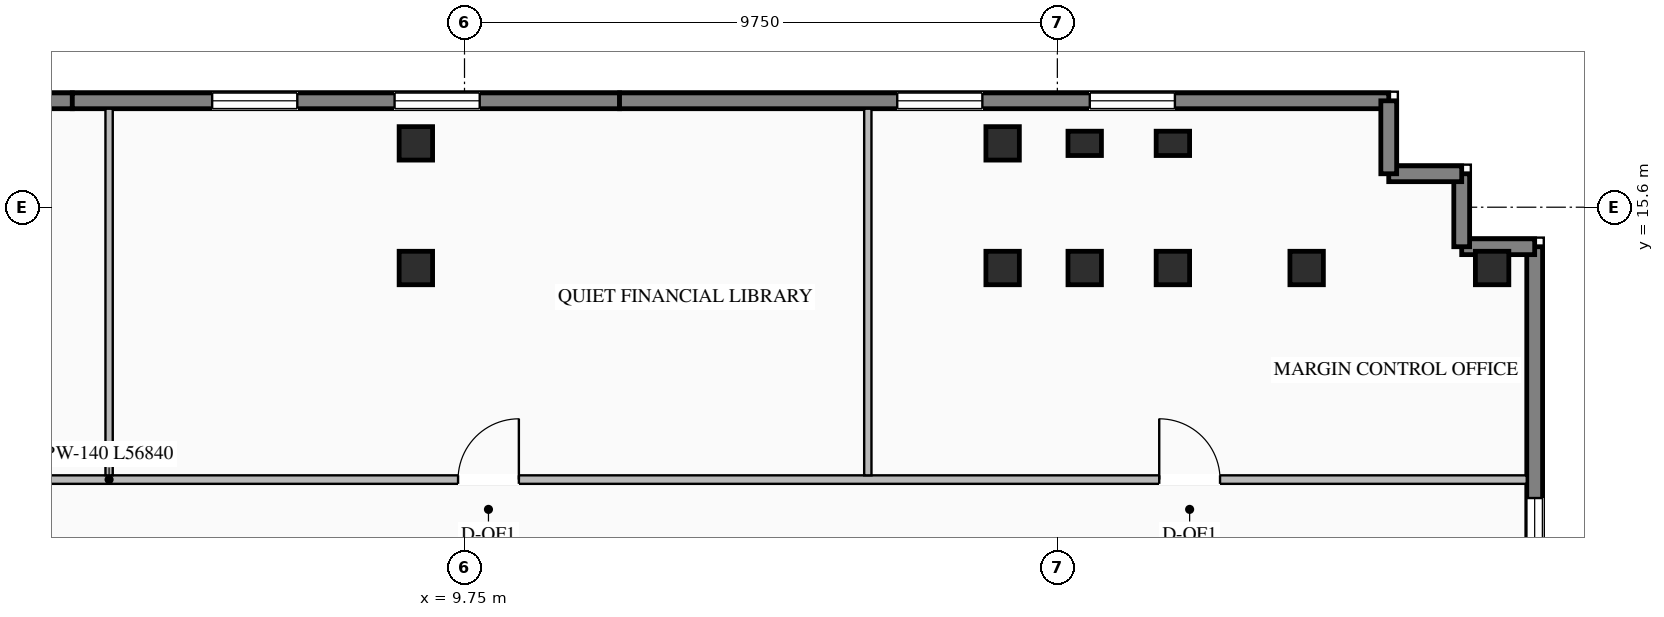
"""IFC4 building model, lengths in metres.
Left out: names, types, materials, properties, quantities, classifications, styles, units other than length and angle.
Written with IfcOpenShell. Run it as: python <this file> out.ifc"""

import sys

from ifc_helpers import new_model, si_unit, direction, frame, frame_2d, origin, origin_2d, place, context, subcontext, project, spatial, rectangle, i_section, extrude, element, fill, save


model = new_model("IFC4")
c1 = context("Model", 3, precision=1e-05, world=origin(), true_north=direction((0.0, 1.0)))
c2 = subcontext(c1, "Body", "Model", "MODEL_VIEW")
j1 = project(units=[si_unit("LENGTHUNIT", "METRE"), si_unit("PLANEANGLEUNIT", "RADIAN")], contexts=[c1])
p1 = place(None, origin())
s1 = spatial("IfcSite", under=j1, at=p1, CompositionType="ELEMENT")
p2 = place(p1, origin())
s2 = spatial("IfcBuilding", under=s1, at=p2, CompositionType="ELEMENT")
p3 = place(p2, frame((0.0, 0.0, 218.85)))
s3 = spatial("IfcBuildingStorey", under=s2, at=p3, CompositionType="ELEMENT", Elevation=218.85)
for number, where, z_axis, x_axis in (
    (1, (8.95, 14.6, 0.0), (0.0, 0.0, 1.0), (1.0, 0.0, 0.0)),
    (2, (18.6, 14.6, 0.0), (0.0, 0.0, 1.0), (1.0, 0.0, 0.0)),
    (3, (19.95, 14.6, 0.0), (0.0, 0.0, 1.0), (1.0, 0.0, 0.0)),
    (4, (21.4, 14.6, 0.0), (0.0, 0.0, 1.0), (1.0, 0.0, 0.0)),
    (5, (23.6, 14.6, 0.0), (0.0, 0.0, 1.0), (1.0, 0.0, 0.0)),
    (6, (8.95, 16.65, 0.0), (0.0, 0.0, 1.0), (1.0, 0.0, 0.0)),
    (7, (18.6, 16.65, 0.0), (0.0, 0.0, 1.0), (1.0, 0.0, 0.0)),
    (8, (26.65, 14.6, 0.0), (0.0, 0.0, 1.0), (1.0, 0.0, 0.0)),
):
    element("IfcColumn", number, at=place(p3, frame(where, z_axis=z_axis, x_axis=x_axis)), inside=s3, PredefinedType="COLUMN", context=c2, shape_type="SweptSolid", body=[
        extrude(i_section(OverallWidth=0.55, OverallDepth=0.55, WebThickness=0.024, FlangeThickness=0.036, at=origin_2d()), origin(), (0.0, 0.0, 1.0), 3.45),
    ])
for number, where, z_axis, x_axis in (
    (9, (19.95, 16.65, 0.0), (0.0, 0.0, 1.0), (1.0, 0.0, 0.0)),
    (10, (21.4, 16.65, 0.0), (0.0, 0.0, 1.0), (1.0, 0.0, 0.0)),
):
    element("IfcColumn", number, at=place(p3, frame(where, z_axis=z_axis, x_axis=x_axis)), inside=s3, PredefinedType="PILASTER", context=c2, shape_type="SweptSolid", body=[
        extrude(rectangle(XDim=0.55, YDim=0.4, at=origin_2d()), origin(), (0.0, 0.0, 1.0), 3.45),
    ])
p4 = place(p3, frame((-5.7, 17.35, 0.0), z_axis=(0.0, 0.0, 1.0), x_axis=(1.0, 0.0, 0.0)))
e11 = element("IfcWall", 11, at=p4, inside=s3, PredefinedType="STANDARD", context=c2, shape_type="SweptSolid", body=[
    extrude(rectangle(XDim=9.0, YDim=0.26, at=frame_2d((4.5, 0.0))), origin(), (0.0, 0.0, 1.0), 3.25),
])
p5 = place(p4, frame((2.3, 0.0, 0.76)))
e12 = element("IfcOpeningElement", 12, at=p5, cuts=e11, PredefinedType="OPENING", context=c2, shape_type="SweptSolid", body=[
    extrude(rectangle(XDim=1.4, YDim=1.95, at=frame_2d((0.7, 0.975))), frame((0.0, 0.14, 0.0), z_axis=(0.0, -1.0, 0.0), x_axis=(1.0, 0.0, 0.0)), (0.0, 0.0, 1.0), 0.28),
])
p6 = place(p4, frame((5.3, 0.0, 0.76)))
e13 = element("IfcOpeningElement", 13, at=p6, cuts=e11, PredefinedType="OPENING", context=c2, shape_type="SweptSolid", body=[
    extrude(rectangle(XDim=1.4, YDim=1.95, at=frame_2d((0.7, 0.975))), frame((0.0, 0.14, 0.0), z_axis=(0.0, -1.0, 0.0), x_axis=(1.0, 0.0, 0.0)), (0.0, 0.0, 1.0), 0.28),
])
p7 = place(p3, frame((3.3, 17.35, 0.0), z_axis=(0.0, 0.0, 1.0), x_axis=(1.0, 0.0, 0.0)))
e14 = element("IfcWall", 14, at=p7, inside=s3, PredefinedType="STANDARD", context=c2, shape_type="SweptSolid", body=[
    extrude(rectangle(XDim=9.0, YDim=0.26, at=frame_2d((4.5, 0.0))), origin(), (0.0, 0.0, 1.0), 3.25),
])
p8 = place(p7, frame((2.3, 0.0, 0.76)))
e15 = element("IfcOpeningElement", 15, at=p8, cuts=e14, PredefinedType="OPENING", context=c2, shape_type="SweptSolid", body=[
    extrude(rectangle(XDim=1.4, YDim=1.95, at=frame_2d((0.7, 0.975))), frame((0.0, 0.14, 0.0), z_axis=(0.0, -1.0, 0.0), x_axis=(1.0, 0.0, 0.0)), (0.0, 0.0, 1.0), 0.28),
])
p9 = place(p7, frame((5.3, 0.0, 0.76)))
e16 = element("IfcOpeningElement", 16, at=p9, cuts=e14, PredefinedType="OPENING", context=c2, shape_type="SweptSolid", body=[
    extrude(rectangle(XDim=1.4, YDim=1.95, at=frame_2d((0.7, 0.975))), frame((0.0, 0.14, 0.0), z_axis=(0.0, -1.0, 0.0), x_axis=(1.0, 0.0, 0.0)), (0.0, 0.0, 1.0), 0.28),
])
p10 = place(p3, frame((12.3, 17.35, 0.0), z_axis=(0.0, 0.0, 1.0), x_axis=(1.0, 0.0, 0.0)))
e17 = element("IfcWall", 17, at=p10, inside=s3, PredefinedType="STANDARD", context=c2, shape_type="SweptSolid", body=[
    extrude(rectangle(XDim=12.65, YDim=0.26, at=frame_2d((6.325, 0.0))), origin(), (0.0, 0.0, 1.0), 3.25),
])
p11 = place(p10, frame((4.567, 0.0, 0.76)))
e18 = element("IfcOpeningElement", 18, at=p11, cuts=e17, PredefinedType="OPENING", context=c2, shape_type="SweptSolid", body=[
    extrude(rectangle(XDim=1.4, YDim=1.95, at=frame_2d((0.7, 0.975))), frame((0.0, 0.14, 0.0), z_axis=(0.0, -1.0, 0.0), x_axis=(1.0, 0.0, 0.0)), (0.0, 0.0, 1.0), 0.28),
])
p12 = place(p10, frame((7.733, 0.0, 0.76)))
e19 = element("IfcOpeningElement", 19, at=p12, cuts=e17, PredefinedType="OPENING", context=c2, shape_type="SweptSolid", body=[
    extrude(rectangle(XDim=1.4, YDim=1.95, at=frame_2d((0.7, 0.975))), frame((0.0, 0.14, 0.0), z_axis=(0.0, -1.0, 0.0), x_axis=(1.0, 0.0, 0.0)), (0.0, 0.0, 1.0), 0.28),
])
p13 = place(p3, frame((27.35, 14.95, 0.0), z_axis=(0.0, 0.0, 1.0), x_axis=(0.0, -1.0, 0.0)))
e20 = element("IfcWall", 20, at=p13, inside=s3, PredefinedType="STANDARD", context=c2, shape_type="SweptSolid", body=[
    extrude(rectangle(XDim=15.85, YDim=0.26, at=frame_2d((7.925, 0.0))), origin(), (0.0, 0.0, 1.0), 3.25),
])
p14 = place(p13, frame((4.133, 0.0, 0.76)))
e21 = element("IfcOpeningElement", 21, at=p14, cuts=e20, PredefinedType="OPENING", context=c2, shape_type="SweptSolid", body=[
    extrude(rectangle(XDim=1.2, YDim=1.95, at=frame_2d((0.6, 0.975))), frame((0.0, 0.14, 0.0), z_axis=(0.0, -1.0, 0.0), x_axis=(1.0, 0.0, 0.0)), (0.0, 0.0, 1.0), 0.28),
])
p15 = place(p13, frame((9.967, 0.0, 0.76)))
e22 = element("IfcOpeningElement", 22, at=p15, cuts=e20, PredefinedType="OPENING", context=c2, shape_type="SweptSolid", body=[
    extrude(rectangle(XDim=1.2, YDim=1.95, at=frame_2d((0.6, 0.975))), frame((0.0, 0.14, 0.0), z_axis=(0.0, -1.0, 0.0), x_axis=(1.0, 0.0, 0.0)), (0.0, 0.0, 1.0), 0.28),
])
p16 = place(p3, frame((27.35, 14.95, 0.0), z_axis=(0.0, 0.0, 1.0), x_axis=(-1.0, 0.0, 0.0)))
e23 = element("IfcWall", 23, at=p16, inside=s3, PredefinedType="STANDARD", context=c2, shape_type="SweptSolid", body=[
    extrude(rectangle(XDim=1.2, YDim=0.26, at=frame_2d((0.6, 0.0))), origin(), (0.0, 0.0, 1.0), 2.565),
])
for number, where, z_axis, x_axis in (
    (24, (26.15, 14.95, 0.0), (0.0, 0.0, 1.0), (0.0, 1.0, 0.0)),
    (25, (26.15, 16.15, 0.0), (0.0, 0.0, 1.0), (-1.0, 0.0, 0.0)),
):
    element("IfcWall", number, at=place(p3, frame(where, z_axis=z_axis, x_axis=x_axis)), inside=s3, PredefinedType="STANDARD", context=c2, shape_type="SweptSolid", body=[
        extrude(rectangle(XDim=1.2, YDim=0.26, at=frame_2d((0.6, 0.0))), origin(), (0.0, 0.0, 1.0), 2.565),
    ])
p17 = place(p3, frame((24.95, 16.15, 0.0), z_axis=(0.0, 0.0, 1.0), x_axis=(0.0, 1.0, 0.0)))
e26 = element("IfcWall", 26, at=p17, inside=s3, PredefinedType="STANDARD", context=c2, shape_type="SweptSolid", body=[
    extrude(rectangle(XDim=1.2, YDim=0.26, at=frame_2d((0.6, 0.0))), origin(), (0.0, 0.0, 1.0), 2.565),
])
p18 = place(p3, frame((-29.62, 11.12, 0.0), z_axis=(0.0, 0.0, 1.0), x_axis=(1.0, 0.0, 0.0)))
e27 = element("IfcWall", 27, at=p18, inside=s3, PredefinedType="STANDARD", context=c2, shape_type="SweptSolid", body=[
    extrude(rectangle(XDim=56.84, YDim=0.14, at=frame_2d((28.42, 0.0))), origin(), (0.0, 0.0, 1.0), 3.25),
])
p19 = place(p18, frame((4.477, 0.0, 0.0)))
e28 = element("IfcOpeningElement", 28, at=p19, cuts=e27, PredefinedType="OPENING", context=c2, shape_type="SweptSolid", body=[
    extrude(rectangle(XDim=1.0, YDim=2.08, at=frame_2d((0.5, 1.04))), frame((0.0, 0.08, 0.0), z_axis=(0.0, -1.0, 0.0), x_axis=(1.0, 0.0, 0.0)), (0.0, 0.0, 1.0), 0.16),
])
p20 = place(p18, frame((14.874, 0.0, 0.0)))
e29 = element("IfcOpeningElement", 29, at=p20, cuts=e27, PredefinedType="OPENING", context=c2, shape_type="SweptSolid", body=[
    extrude(rectangle(XDim=1.0, YDim=2.08, at=frame_2d((0.5, 1.04))), frame((0.0, 0.08, 0.0), z_axis=(0.0, -1.0, 0.0), x_axis=(1.0, 0.0, 0.0)), (0.0, 0.0, 1.0), 0.16),
])
p21 = place(p18, frame((26.785, 0.0, 0.0)))
e30 = element("IfcOpeningElement", 30, at=p21, cuts=e27, PredefinedType="OPENING", context=c2, shape_type="SweptSolid", body=[
    extrude(rectangle(XDim=1.0, YDim=2.08, at=frame_2d((0.5, 1.04))), frame((0.0, 0.08, 0.0), z_axis=(0.0, -1.0, 0.0), x_axis=(1.0, 0.0, 0.0)), (0.0, 0.0, 1.0), 0.16),
])
p22 = place(p18, frame((39.264, 0.0, 0.0)))
e31 = element("IfcOpeningElement", 31, at=p22, cuts=e27, PredefinedType="OPENING", context=c2, shape_type="SweptSolid", body=[
    extrude(rectangle(XDim=1.0, YDim=2.08, at=frame_2d((0.5, 1.04))), frame((0.0, 0.08, 0.0), z_axis=(0.0, -1.0, 0.0), x_axis=(1.0, 0.0, 0.0)), (0.0, 0.0, 1.0), 0.16),
])
p23 = place(p18, frame((50.795, 0.0, 0.0)))
e32 = element("IfcOpeningElement", 32, at=p23, cuts=e27, PredefinedType="OPENING", context=c2, shape_type="SweptSolid", body=[
    extrude(rectangle(XDim=1.0, YDim=2.08, at=frame_2d((0.5, 1.04))), frame((0.0, 0.08, 0.0), z_axis=(0.0, -1.0, 0.0), x_axis=(1.0, 0.0, 0.0)), (0.0, 0.0, 1.0), 0.16),
])
for number, where, z_axis, x_axis in (
    (33, (3.905, 11.19, 0.0), (0.0, 0.0, 1.0), (0.0, 1.0, 0.0)),
    (34, (16.383, 11.19, 0.0), (0.0, 0.0, 1.0), (0.0, 1.0, 0.0)),
):
    element("IfcWall", number, at=place(p3, frame(where, z_axis=z_axis, x_axis=x_axis)), inside=s3, PredefinedType="STANDARD", context=c2, shape_type="SweptSolid", body=[
        extrude(rectangle(XDim=6.03, YDim=0.12, at=frame_2d((3.015, 0.0))), origin(), (0.0, 0.0, 1.0), 3.25),
    ])
p24 = place(p8, origin())
e35 = element("IfcWindow", 35, at=p24, inside=s3, PartitioningType="SINGLE_PANEL", PredefinedType="WINDOW", context=c2, shape_type="SweptSolid", body=[
    extrude(rectangle(XDim=1.4, YDim=1.95, at=frame_2d((0.7, 0.975))), frame((0.0, 0.03, 0.0), z_axis=(0.0, -1.0, 0.0), x_axis=(1.0, 0.0, 0.0)), (0.0, 0.0, 1.0), 0.06),
])
fill(e15, e35)
p25 = place(p9, origin())
e36 = element("IfcWindow", 36, at=p25, inside=s3, PartitioningType="SINGLE_PANEL", PredefinedType="WINDOW", context=c2, shape_type="SweptSolid", body=[
    extrude(rectangle(XDim=1.4, YDim=1.95, at=frame_2d((0.7, 0.975))), frame((0.0, 0.03, 0.0), z_axis=(0.0, -1.0, 0.0), x_axis=(1.0, 0.0, 0.0)), (0.0, 0.0, 1.0), 0.06),
])
fill(e16, e36)
p26 = place(p11, origin())
e37 = element("IfcWindow", 37, at=p26, inside=s3, PartitioningType="SINGLE_PANEL", PredefinedType="WINDOW", context=c2, shape_type="SweptSolid", body=[
    extrude(rectangle(XDim=1.4, YDim=1.95, at=frame_2d((0.7, 0.975))), frame((0.0, 0.03, 0.0), z_axis=(0.0, -1.0, 0.0), x_axis=(1.0, 0.0, 0.0)), (0.0, 0.0, 1.0), 0.06),
])
fill(e18, e37)
p27 = place(p12, origin())
e38 = element("IfcWindow", 38, at=p27, inside=s3, PartitioningType="SINGLE_PANEL", PredefinedType="WINDOW", context=c2, shape_type="SweptSolid", body=[
    extrude(rectangle(XDim=1.4, YDim=1.95, at=frame_2d((0.7, 0.975))), frame((0.0, 0.03, 0.0), z_axis=(0.0, -1.0, 0.0), x_axis=(1.0, 0.0, 0.0)), (0.0, 0.0, 1.0), 0.06),
])
fill(e19, e38)
p28 = place(p14, origin())
e39 = element("IfcWindow", 39, at=p28, inside=s3, PartitioningType="SINGLE_PANEL", PredefinedType="WINDOW", context=c2, shape_type="SweptSolid", body=[
    extrude(rectangle(XDim=1.2, YDim=1.95, at=frame_2d((0.6, 0.975))), frame((0.0, 0.03, 0.0), z_axis=(0.0, -1.0, 0.0), x_axis=(1.0, 0.0, 0.0)), (0.0, 0.0, 1.0), 0.06),
])
fill(e21, e39)
p29 = place(p22, origin())
e40 = element("IfcDoor", 40, at=p29, inside=s3, OperationType="SINGLE_SWING_RIGHT", PredefinedType="DOOR", context=c2, shape_type="SweptSolid", body=[
    extrude(rectangle(XDim=1.0, YDim=2.08, at=frame_2d((0.5, 1.04))), frame((0.0, 0.025, 0.0), z_axis=(0.0, -1.0, 0.0), x_axis=(1.0, 0.0, 0.0)), (0.0, 0.0, 1.0), 0.05),
])
fill(e31, e40)
p30 = place(p23, origin())
e41 = element("IfcDoor", 41, at=p30, inside=s3, OperationType="SINGLE_SWING_LEFT", PredefinedType="DOOR", context=c2, shape_type="SweptSolid", body=[
    extrude(rectangle(XDim=1.0, YDim=2.08, at=frame_2d((0.5, 1.04))), frame((0.0, 0.025, 0.0), z_axis=(0.0, -1.0, 0.0), x_axis=(1.0, 0.0, 0.0)), (0.0, 0.0, 1.0), 0.05),
])
fill(e32, e41)
save(model, sys.argv[1])
